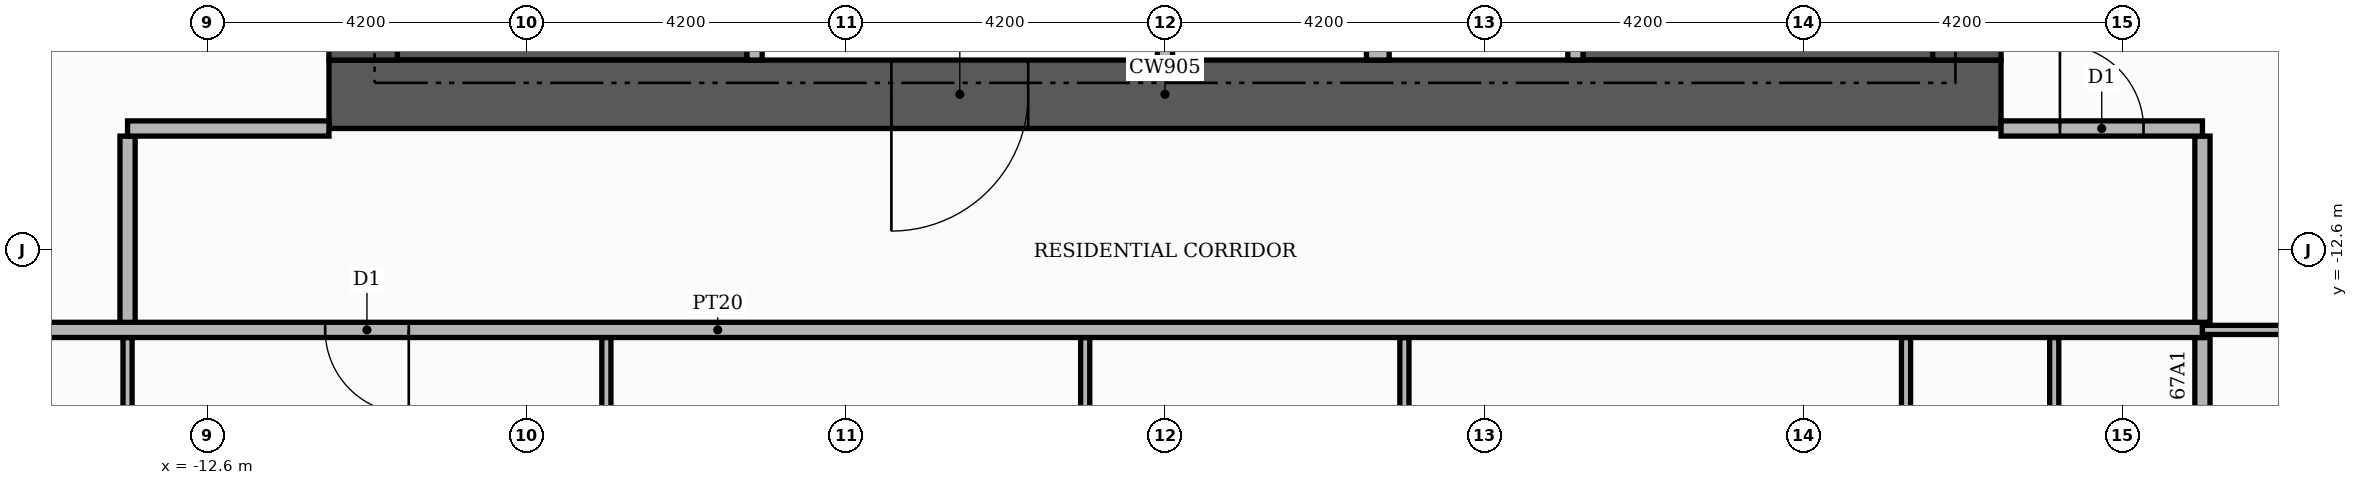
"""IFC4 building model, lengths in metres.
Left out: names, types, materials, properties, quantities, classifications, styles, units other than length and angle.
Written with IfcOpenShell. Run it as: python <this file> out.ifc"""

import sys

from ifc_helpers import new_model, si_unit, direction, frame, frame_2d, origin, place, context, subcontext, project, spatial, rectangle, extrude, element, fill, save


model = new_model("IFC4")
c1 = context("Model", 3, precision=1e-05, world=origin(), true_north=direction((0.0, 1.0)))
c2 = subcontext(c1, "Body", "Model", "MODEL_VIEW")
j1 = project(units=[si_unit("LENGTHUNIT", "METRE"), si_unit("PLANEANGLEUNIT", "RADIAN")], contexts=[c1])
p1 = place(None, origin())
s1 = spatial("IfcSite", under=j1, at=p1, CompositionType="ELEMENT")
p2 = place(p1, origin())
s2 = spatial("IfcBuilding", under=s1, at=p2, CompositionType="ELEMENT")
p3 = place(p2, frame((0.0, 0.0, 279.6)))
s3 = spatial("IfcBuildingStorey", under=s2, at=p3, CompositionType="ELEMENT", Elevation=279.6)
for number, where, z_axis, x_axis in (
    (1, (-10.1, -9.15, 0.0), (0.0, 0.0, 1.0), (1.0, 0.0, 0.0)),
    (2, (5.5, -9.15, 0.0), (0.0, 0.0, 1.0), (1.0, 0.0, 0.0)),
):
    element("IfcWall", number, at=place(p3, frame(where, z_axis=z_axis, x_axis=x_axis)), inside=s3, PredefinedType="SHEAR", context=c2, shape_type="SweptSolid", body=[
        extrude(rectangle(XDim=4.6, YDim=1.9, at=frame_2d((2.3, 0.0))), origin(), (0.0, 0.0, 1.0), 3.48),
    ])
p4 = place(p3, frame((-11.0, -10.55, 0.0), z_axis=(0.0, 0.0, 1.0), x_axis=(1.0, 0.0, 0.0)))
e3 = element("IfcWall", 3, at=p4, inside=s3, PredefinedType="SHEAR", context=c2, shape_type="SweptSolid", body=[
    extrude(rectangle(XDim=22.0, YDim=0.9, at=frame_2d((11.0, 0.0))), origin(), (0.0, 0.0, 1.0), 3.48),
])
p5 = place(p4, frame((7.4, 0.0, 0.0)))
e4 = element("IfcOpeningElement", 4, at=p5, cuts=e3, PredefinedType="OPENING", context=c2, shape_type="SweptSolid", body=[
    extrude(rectangle(XDim=1.8, YDim=2.2, at=frame_2d((0.9, 1.1))), frame((0.0, 0.46, 0.0), z_axis=(0.0, -1.0, 0.0), x_axis=(1.0, 0.0, 0.0)), (0.0, 0.0, 1.0), 0.92),
])
for number, where, z_axis, x_axis in (
    (5, (-10.55, -10.1, 0.0), (0.0, 0.0, 1.0), (0.0, 1.0, 0.0)),
    (6, (10.55, -10.1, 0.0), (0.0, 0.0, 1.0), (0.0, 1.0, 0.0)),
):
    element("IfcWall", number, at=place(p3, frame(where, z_axis=z_axis, x_axis=x_axis)), inside=s3, PredefinedType="SHEAR", context=c2, shape_type="SweptSolid", body=[
        extrude(rectangle(XDim=20.2, YDim=0.9, at=frame_2d((10.1, 0.0))), origin(), (0.0, 0.0, 1.0), 3.48),
    ])
p6 = place(p3, frame((-5.4, -10.1, 0.0), z_axis=(0.0, 0.0, 1.0), x_axis=(0.0, 1.0, 0.0)))
e7 = element("IfcWall", 7, at=p6, inside=s3, PredefinedType="PARTITIONING", context=c2, shape_type="SweptSolid", body=[
    extrude(rectangle(XDim=4.6, YDim=0.2, at=frame_2d((2.3, 0.0))), origin(), (0.0, 0.0, 1.0), 3.48),
])
p7 = place(p6, frame((2.9, 0.0, 0.0)))
e8 = element("IfcOpeningElement", 8, at=p7, cuts=e7, PredefinedType="OPENING", context=c2, shape_type="SweptSolid", body=[
    extrude(rectangle(XDim=1.0, YDim=2.1, at=frame_2d((0.5, 1.05))), frame((0.0, 0.11, 0.0), z_axis=(0.0, -1.0, 0.0), x_axis=(1.0, 0.0, 0.0)), (0.0, 0.0, 1.0), 0.22),
])
p8 = place(p3, frame((0.0, -10.1, 0.0), z_axis=(0.0, 0.0, 1.0), x_axis=(0.0, 1.0, 0.0)))
e9 = element("IfcWall", 9, at=p8, inside=s3, PredefinedType="PARTITIONING", context=c2, shape_type="SweptSolid", body=[
    extrude(rectangle(XDim=2.2, YDim=0.2, at=frame_2d((1.1, 0.0))), origin(), (0.0, 0.0, 1.0), 3.48),
])
p9 = place(p3, frame((2.8, -10.1, 0.0), z_axis=(0.0, 0.0, 1.0), x_axis=(0.0, 1.0, 0.0)))
e10 = element("IfcWall", 10, at=p9, inside=s3, PredefinedType="PARTITIONING", context=c2, shape_type="SweptSolid", body=[
    extrude(rectangle(XDim=2.2, YDim=0.3, at=frame_2d((1.1, 0.0))), origin(), (0.0, 0.0, 1.0), 3.48),
])
p10 = place(p3, frame((5.4, -10.1, 0.0), z_axis=(0.0, 0.0, 1.0), x_axis=(0.0, 1.0, 0.0)))
e11 = element("IfcWall", 11, at=p10, inside=s3, PredefinedType="PARTITIONING", context=c2, shape_type="SweptSolid", body=[
    extrude(rectangle(XDim=4.6, YDim=0.2, at=frame_2d((2.3, 0.0))), origin(), (0.0, 0.0, 1.0), 3.48),
])
p11 = place(p10, frame((2.9, 0.0, 0.0)))
e12 = element("IfcOpeningElement", 12, at=p11, cuts=e11, PredefinedType="OPENING", context=c2, shape_type="SweptSolid", body=[
    extrude(rectangle(XDim=1.0, YDim=2.1, at=frame_2d((0.5, 1.05))), frame((0.0, 0.11, 0.0), z_axis=(0.0, -1.0, 0.0), x_axis=(1.0, 0.0, 0.0)), (0.0, 0.0, 1.0), 0.22),
])
p12 = place(p3, frame((13.65, -20.42, 0.0), z_axis=(0.0, 0.0, 1.0), x_axis=(0.0, 1.0, 0.0)))
e13 = element("IfcWall", 13, at=p12, inside=s3, PredefinedType="PARTITIONING", context=c2, shape_type="SweptSolid", body=[
    extrude(rectangle(XDim=6.67, YDim=0.2, at=frame_2d((3.335, 0.0))), origin(), (0.0, 0.0, 1.0), 3.48),
])
p13 = place(p3, frame((-13.65, -20.119, 0.0), z_axis=(0.0, 0.0, 1.0), x_axis=(0.0, 1.0, 0.0)))
e14 = element("IfcWall", 14, at=p13, inside=s3, PredefinedType="PARTITIONING", context=c2, shape_type="SweptSolid", body=[
    extrude(rectangle(XDim=6.369, YDim=0.12, at=frame_2d((3.185, 0.0))), origin(), (0.0, 0.0, 1.0), 3.48),
])
p14 = place(p13, frame((2.784, 0.0, 0.0)))
e15 = element("IfcOpeningElement", 15, at=p14, cuts=e14, PredefinedType="OPENING", context=c2, shape_type="SweptSolid", body=[
    extrude(rectangle(XDim=0.9, YDim=2.1, at=frame_2d((0.45, 1.05))), frame((0.0, 0.07, 0.0), z_axis=(0.0, -1.0, 0.0), x_axis=(1.0, 0.0, 0.0)), (0.0, 0.0, 1.0), 0.14),
])
for number, where, z_axis, x_axis in (
    (16, (-7.35, -18.56, 0.0), (0.0, 0.0, 1.0), (0.0, 1.0, 0.0)),
    (17, (-1.05, -18.56, 0.0), (0.0, 0.0, 1.0), (0.0, 1.0, 0.0)),
    (18, (3.15, -18.56, 0.0), (0.0, 0.0, 1.0), (0.0, 1.0, 0.0)),
    (19, (9.75, -18.56, 0.0), (0.0, 0.0, 1.0), (0.0, 1.0, 0.0)),
    (20, (11.7, -18.56, 0.0), (0.0, 0.0, 1.0), (0.0, 1.0, 0.0)),
):
    element("IfcWall", number, at=place(p3, frame(where, z_axis=z_axis, x_axis=x_axis)), inside=s3, PredefinedType="PARTITIONING", context=c2, shape_type="SweptSolid", body=[
        extrude(rectangle(XDim=4.81, YDim=0.12, at=frame_2d((2.405, 0.0))), origin(), (0.0, 0.0, 1.0), 3.48),
    ])
p15 = place(p3, frame((-25.42, -13.65, 0.0), z_axis=(0.0, 0.0, 1.0), x_axis=(1.0, 0.0, 0.0)))
e21 = element("IfcWall", 21, at=p15, inside=s3, PredefinedType="PARTITIONING", context=c2, shape_type="SweptSolid", body=[
    extrude(rectangle(XDim=39.07, YDim=0.2, at=frame_2d((19.535, 0.0))), origin(), (0.0, 0.0, 1.0), 3.48),
])
p16 = place(p15, frame((14.37, 0.0, 0.0)))
e22 = element("IfcOpeningElement", 22, at=p16, cuts=e21, PredefinedType="OPENING", context=c2, shape_type="SweptSolid", body=[
    extrude(rectangle(XDim=1.1, YDim=2.4, at=frame_2d((0.55, 1.2))), frame((0.0, 0.11, 0.0), z_axis=(0.0, -1.0, 0.0), x_axis=(1.0, 0.0, 0.0)), (0.0, 0.0, 1.0), 0.22),
])
p17 = place(p3, frame((13.65, -13.65, 0.0), z_axis=(0.0, 0.0, 1.0), x_axis=(1.0, 0.0, 0.0)))
e23 = element("IfcWall", 23, at=p17, inside=s3, PredefinedType="PARTITIONING", context=c2, shape_type="SweptSolid", body=[
    extrude(rectangle(XDim=6.77, YDim=0.12, at=frame_2d((3.385, 0.0))), origin(), (0.0, 0.0, 1.0), 3.48),
])
p18 = place(p17, frame((2.885, 0.0, 0.0)))
e24 = element("IfcOpeningElement", 24, at=p18, cuts=e23, PredefinedType="OPENING", context=c2, shape_type="SweptSolid", body=[
    extrude(rectangle(XDim=1.0, YDim=2.1, at=frame_2d((0.5, 1.05))), frame((0.0, 0.07, 0.0), z_axis=(0.0, -1.0, 0.0), x_axis=(1.0, 0.0, 0.0)), (0.0, 0.0, 1.0), 0.14),
])
for number, where, z_axis, x_axis in (
    (25, (-13.65, -13.55, 0.0), (0.0, 0.0, 1.0), (0.0, 1.0, 0.0)),
    (26, (13.65, -13.55, 0.0), (0.0, 0.0, 1.0), (0.0, 1.0, 0.0)),
):
    element("IfcWall", number, at=place(p3, frame(where, z_axis=z_axis, x_axis=x_axis)), inside=s3, PredefinedType="PARTITIONING", context=c2, shape_type="SweptSolid", body=[
        extrude(rectangle(XDim=2.45, YDim=0.2, at=frame_2d((1.225, 0.0))), origin(), (0.0, 0.0, 1.0), 3.48),
    ])
p19 = place(p3, frame((-13.65, -11.0, 0.0), z_axis=(0.0, 0.0, 1.0), x_axis=(1.0, 0.0, 0.0)))
e27 = element("IfcWall", 27, at=p19, inside=s3, PredefinedType="PARTITIONING", context=c2, shape_type="SweptSolid", body=[
    extrude(rectangle(XDim=2.65, YDim=0.2, at=frame_2d((1.325, 0.0))), origin(), (0.0, 0.0, 1.0), 3.48),
])
p20 = place(p3, frame((11.0, -11.0, 0.0), z_axis=(0.0, 0.0, 1.0), x_axis=(1.0, 0.0, 0.0)))
e28 = element("IfcWall", 28, at=p20, inside=s3, PredefinedType="PARTITIONING", context=c2, shape_type="SweptSolid", body=[
    extrude(rectangle(XDim=2.65, YDim=0.2, at=frame_2d((1.325, 0.0))), origin(), (0.0, 0.0, 1.0), 3.48),
])
p21 = place(p20, frame((0.775, 0.0, 0.0)))
e29 = element("IfcOpeningElement", 29, at=p21, cuts=e28, PredefinedType="OPENING", context=c2, shape_type="SweptSolid", body=[
    extrude(rectangle(XDim=1.1, YDim=2.4, at=frame_2d((0.55, 1.2))), frame((0.0, 0.11, 0.0), z_axis=(0.0, -1.0, 0.0), x_axis=(1.0, 0.0, 0.0)), (0.0, 0.0, 1.0), 0.22),
])
p22 = place(p5, frame((1.8, 0.0, 0.0), z_axis=(0.0, 0.0, 1.0), x_axis=(-1.0, 0.0, 0.0)))
e30 = element("IfcDoor", 30, at=p22, inside=s3, OperationType="DOUBLE_DOOR_SINGLE_SWING", PredefinedType="DOOR", context=c2, shape_type="SweptSolid", body=[
    extrude(rectangle(XDim=1.8, YDim=2.2, at=frame_2d((0.9, 1.1))), frame((0.0, 0.025, 0.0), z_axis=(0.0, -1.0, 0.0), x_axis=(1.0, 0.0, 0.0)), (0.0, 0.0, 1.0), 0.05),
])
fill(e4, e30)
p23 = place(p16, frame((1.1, 0.0, 0.0), z_axis=(0.0, 0.0, 1.0), x_axis=(-1.0, 0.0, 0.0)))
e31 = element("IfcDoor", 31, at=p23, inside=s3, OperationType="SINGLE_SWING_RIGHT", PredefinedType="DOOR", context=c2, shape_type="SweptSolid", body=[
    extrude(rectangle(XDim=1.1, YDim=2.4, at=frame_2d((0.55, 1.2))), frame((0.0, 0.025, 0.0), z_axis=(0.0, -1.0, 0.0), x_axis=(1.0, 0.0, 0.0)), (0.0, 0.0, 1.0), 0.05),
])
fill(e22, e31)
p24 = place(p21, origin())
e32 = element("IfcDoor", 32, at=p24, inside=s3, OperationType="SINGLE_SWING_LEFT", PredefinedType="DOOR", context=c2, shape_type="SweptSolid", body=[
    extrude(rectangle(XDim=1.1, YDim=2.4, at=frame_2d((0.55, 1.2))), frame((0.0, 0.025, 0.0), z_axis=(0.0, -1.0, 0.0), x_axis=(1.0, 0.0, 0.0)), (0.0, 0.0, 1.0), 0.05),
])
fill(e29, e32)
save(model, sys.argv[1])
